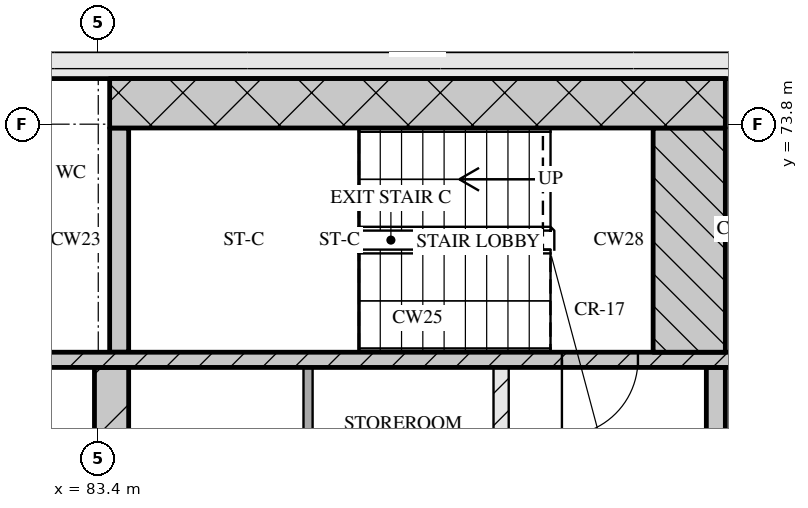
"""IFC4 building model, lengths in metres.
Left out: names, types, materials, properties, quantities, classifications, styles, units other than length and angle.
Written with IfcOpenShell. Run it as: python <this file> out.ifc"""

import sys

from ifc_helpers import new_model, si_unit, direction, frame, frame_2d, origin, place, context, subcontext, project, spatial, rectangle, extrude, element, fill, save


model = new_model("IFC4")
c1 = context("Model", 3, precision=1e-05, world=origin(), true_north=direction((0.0, 1.0)))
c2 = subcontext(c1, "Body", "Model", "MODEL_VIEW")
j1 = project(units=[si_unit("LENGTHUNIT", "METRE"), si_unit("PLANEANGLEUNIT", "RADIAN")], contexts=[c1])
p1 = place(None, origin())
s1 = spatial("IfcSite", under=j1, at=p1, CompositionType="ELEMENT")
p2 = place(p1, origin())
s2 = spatial("IfcBuilding", under=s1, at=p2, CompositionType="ELEMENT")
p3 = place(p2, frame((0.0, 0.0, 299.55)))
s3 = spatial("IfcBuildingStorey", under=s2, at=p3, CompositionType="ELEMENT", Elevation=299.55)
p4 = place(p3, frame((67.3, 74.65, 0.0), z_axis=(0.0, 0.0, 1.0), x_axis=(1.0, 0.0, 0.0)))
e1 = element("IfcWall", 1, at=p4, inside=s3, PredefinedType="SOLIDWALL", context=c2, shape_type="SweptSolid", body=[
    extrude(rectangle(XDim=40.6, YDim=0.5, at=frame_2d((20.3, 0.0))), origin(), (0.0, 0.0, 1.0), 3.32),
])
p5 = place(p3, frame((83.575, 68.0, 0.0), z_axis=(0.0, 0.0, 1.0), x_axis=(0.0, 1.0, 0.0)))
e2 = element("IfcWall", 2, at=p5, inside=s3, PredefinedType="SOLIDWALL", context=c2, shape_type="SweptSolid", body=[
    extrude(rectangle(XDim=2.6, YDim=0.45, at=frame_2d((1.3, 0.0))), origin(), (0.0, 0.0, 1.0), 3.32),
])
p6 = place(p3, frame((86.16, 68.0, 0.0), z_axis=(0.0, 0.0, 1.0), x_axis=(0.0, 1.0, 0.0)))
e3 = element("IfcWall", 3, at=p6, inside=s3, PredefinedType="PARTITIONING", context=c2, shape_type="SweptSolid", body=[
    extrude(rectangle(XDim=2.6, YDim=0.12, at=frame_2d((1.3, 0.0))), origin(), (0.0, 0.0, 1.0), 3.32),
])
p7 = place(p3, frame((88.7, 68.0, 0.0), z_axis=(0.0, 0.0, 1.0), x_axis=(0.0, 1.0, 0.0)))
e4 = element("IfcWall", 4, at=p7, inside=s3, PredefinedType="PARTITIONING", context=c2, shape_type="SweptSolid", body=[
    extrude(rectangle(XDim=2.6, YDim=0.2, at=frame_2d((1.3, 0.0))), origin(), (0.0, 0.0, 1.0), 3.32),
])
p8 = place(p3, frame((91.525, 68.0, 0.0), z_axis=(0.0, 0.0, 1.0), x_axis=(0.0, 1.0, 0.0)))
e5 = element("IfcWall", 5, at=p8, inside=s3, PredefinedType="SOLIDWALL", context=c2, shape_type="SweptSolid", body=[
    extrude(rectangle(XDim=2.6, YDim=0.25, at=frame_2d((1.3, 0.0))), origin(), (0.0, 0.0, 1.0), 3.32),
])
p9 = place(p3, frame((67.8, 70.7, 0.0), z_axis=(0.0, 0.0, 1.0), x_axis=(1.0, 0.0, 0.0)))
e6 = element("IfcWall", 6, at=p9, inside=s3, PredefinedType="SOLIDWALL", context=c2, shape_type="SweptSolid", body=[
    extrude(rectangle(XDim=39.6, YDim=0.2, at=frame_2d((19.8, 0.0))), origin(), (0.0, 0.0, 1.0), 3.32),
])
p10 = place(p9, frame((0.65, 0.0, 0.0)))
e7 = element("IfcOpeningElement", 7, at=p10, cuts=e6, PredefinedType="OPENING", context=c2, shape_type="SweptSolid", body=[
    extrude(rectangle(XDim=1.1, YDim=2.1, at=frame_2d((0.55, 1.05))), frame((0.0, 0.11, 0.0), z_axis=(0.0, -1.0, 0.0), x_axis=(1.0, 0.0, 0.0)), (0.0, 0.0, 1.0), 0.22),
])
p11 = place(p9, frame((3.25, 0.0, 0.0)))
e8 = element("IfcOpeningElement", 8, at=p11, cuts=e6, PredefinedType="OPENING", context=c2, shape_type="SweptSolid", body=[
    extrude(rectangle(XDim=1.1, YDim=2.1, at=frame_2d((0.55, 1.05))), frame((0.0, 0.11, 0.0), z_axis=(0.0, -1.0, 0.0), x_axis=(1.0, 0.0, 0.0)), (0.0, 0.0, 1.0), 0.22),
])
p12 = place(p9, frame((5.9, 0.0, 0.0)))
e9 = element("IfcOpeningElement", 9, at=p12, cuts=e6, PredefinedType="OPENING", context=c2, shape_type="SweptSolid", body=[
    extrude(rectangle(XDim=1.0, YDim=2.1, at=frame_2d((0.5, 1.05))), frame((0.0, 0.11, 0.0), z_axis=(0.0, -1.0, 0.0), x_axis=(1.0, 0.0, 0.0)), (0.0, 0.0, 1.0), 0.22),
])
p13 = place(p9, frame((21.7, 0.0, 0.0)))
e10 = element("IfcOpeningElement", 10, at=p13, cuts=e6, PredefinedType="OPENING", context=c2, shape_type="SweptSolid", body=[
    extrude(rectangle(XDim=1.0, YDim=2.1, at=frame_2d((0.5, 1.05))), frame((0.0, 0.11, 0.0), z_axis=(0.0, -1.0, 0.0), x_axis=(1.0, 0.0, 0.0)), (0.0, 0.0, 1.0), 0.22),
])
p14 = place(p9, frame((32.7, 0.0, 0.0)))
e11 = element("IfcOpeningElement", 11, at=p14, cuts=e6, PredefinedType="OPENING", context=c2, shape_type="SweptSolid", body=[
    extrude(rectangle(XDim=1.0, YDim=2.1, at=frame_2d((0.5, 1.05))), frame((0.0, 0.11, 0.0), z_axis=(0.0, -1.0, 0.0), x_axis=(1.0, 0.0, 0.0)), (0.0, 0.0, 1.0), 0.22),
])
p15 = place(p9, frame((35.25, 0.0, 0.0)))
e12 = element("IfcOpeningElement", 12, at=p15, cuts=e6, PredefinedType="OPENING", context=c2, shape_type="SweptSolid", body=[
    extrude(rectangle(XDim=1.1, YDim=2.1, at=frame_2d((0.55, 1.05))), frame((0.0, 0.11, 0.0), z_axis=(0.0, -1.0, 0.0), x_axis=(1.0, 0.0, 0.0)), (0.0, 0.0, 1.0), 0.22),
])
p16 = place(p9, frame((37.85, 0.0, 0.0)))
e13 = element("IfcOpeningElement", 13, at=p16, cuts=e6, PredefinedType="OPENING", context=c2, shape_type="SweptSolid", body=[
    extrude(rectangle(XDim=1.1, YDim=2.1, at=frame_2d((0.55, 1.05))), frame((0.0, 0.11, 0.0), z_axis=(0.0, -1.0, 0.0), x_axis=(1.0, 0.0, 0.0)), (0.0, 0.0, 1.0), 0.22),
])
p17 = place(p3, frame((83.675, 70.8, 0.0), z_axis=(0.0, 0.0, 1.0), x_axis=(0.0, 1.0, 0.0)))
e14 = element("IfcWall", 14, at=p17, inside=s3, PredefinedType="SOLIDWALL", context=c2, shape_type="SweptSolid", body=[
    extrude(rectangle(XDim=2.95, YDim=0.25, at=frame_2d((1.475, 0.0))), origin(), (0.0, 0.0, 1.0), 3.32),
])
p18 = place(p3, frame((91.175, 70.8, 0.0), z_axis=(0.0, 0.0, 1.0), x_axis=(0.0, 1.0, 0.0)))
e15 = element("IfcWall", 15, at=p18, inside=s3, PredefinedType="SOLIDWALL", context=c2, shape_type="SweptSolid", body=[
    extrude(rectangle(XDim=2.95, YDim=0.95, at=frame_2d((1.475, 0.0))), origin(), (0.0, 0.0, 1.0), 3.32),
])
p19 = place(p3, frame((83.55, 74.075, 0.0), z_axis=(0.0, 0.0, 1.0), x_axis=(1.0, 0.0, 0.0)))
e16 = element("IfcWall", 16, at=p19, inside=s3, PredefinedType="SOLIDWALL", context=c2, shape_type="SweptSolid", body=[
    extrude(rectangle(XDim=8.1, YDim=0.65, at=frame_2d((4.05, 0.0))), origin(), (0.0, 0.0, 1.0), 3.32),
])
p20 = place(p13, origin())
e17 = element("IfcDoor", 17, at=p20, inside=s3, OperationType="SINGLE_SWING_RIGHT", PredefinedType="DOOR", context=c2, shape_type="SweptSolid", body=[
    extrude(rectangle(XDim=1.0, YDim=2.1, at=frame_2d((0.5, 1.05))), frame((0.0, 0.025, 0.0), z_axis=(0.0, -1.0, 0.0), x_axis=(1.0, 0.0, 0.0)), (0.0, 0.0, 1.0), 0.05),
])
fill(e10, e17)
save(model, sys.argv[1])
